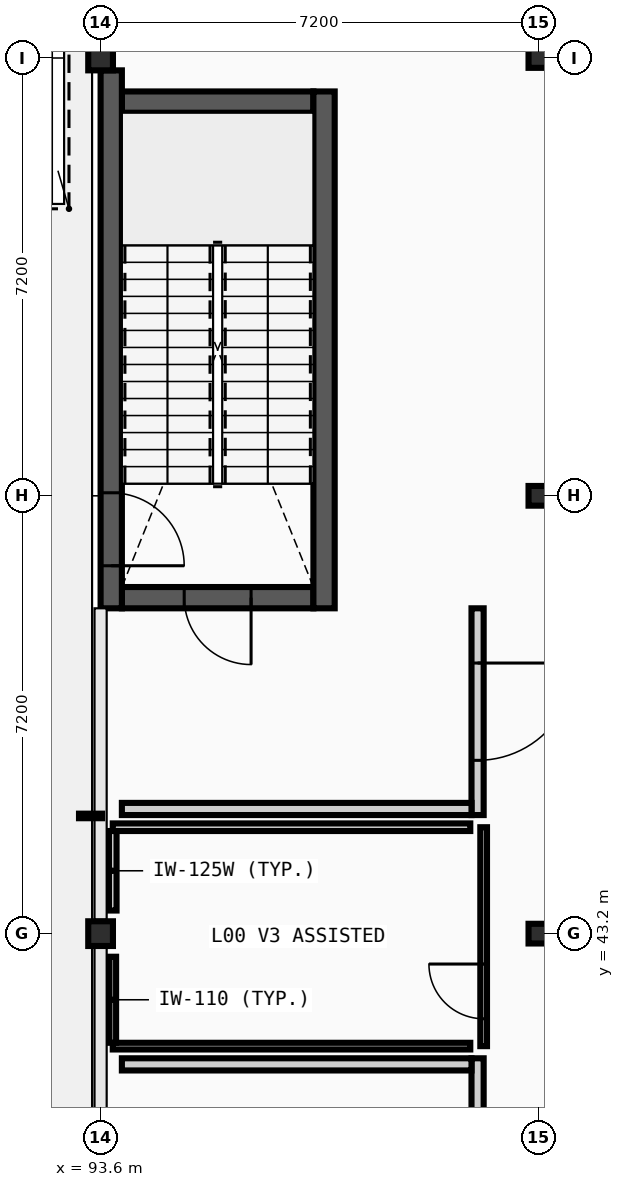
"""IFC4 building model, lengths in metres.
Left out: names, types, materials, properties, quantities, classifications, styles, units other than length and angle.
Written with IfcOpenShell. Run it as: python <this file> out.ifc"""

import sys

from ifc_helpers import new_model, si_unit, direction, frame, frame_2d, origin, origin_2d, place, context, subcontext, project, spatial, rectangle, hollow_circle, extrude, element, fill, save


model = new_model("IFC4")
c1 = context("Model", 3, precision=1e-05, world=origin(), true_north=direction((0.0, 1.0)))
c2 = subcontext(c1, "Body", "Model", "MODEL_VIEW")
j1 = project(units=[si_unit("LENGTHUNIT", "METRE"), si_unit("PLANEANGLEUNIT", "RADIAN")], contexts=[c1])
p1 = place(None, origin())
s1 = spatial("IfcSite", under=j1, at=p1, CompositionType="ELEMENT")
p2 = place(p1, origin())
s2 = spatial("IfcBuilding", under=s1, at=p2, CompositionType="ELEMENT")
p3 = place(p2, origin())
s3 = spatial("IfcBuildingStorey", under=s2, at=p3, CompositionType="ELEMENT", Elevation=0.0)
for number, where, z_axis, x_axis in (
    (1, (93.6, 43.2, 0.0), (0.0, 0.0, 1.0), (1.0, 0.0, 0.0)),
    (2, (93.6, 57.6, 0.0), (0.0, 0.0, 1.0), (1.0, 0.0, 0.0)),
):
    element("IfcColumn", number, at=place(p3, frame(where, z_axis=z_axis, x_axis=x_axis)), inside=s3, PredefinedType="COLUMN", context=c2, shape_type="SweptSolid", body=[
        extrude(hollow_circle(Radius=0.203, WallThickness=0.016, at=origin_2d()), origin(), (0.0, 0.0, 1.0), 5.2),
    ])
for number, where, z_axis, x_axis in (
    (3, (100.8, 43.2, 0.0), (0.0, 0.0, 1.0), (1.0, 0.0, 0.0)),
    (4, (100.8, 50.4, 0.0), (0.0, 0.0, 1.0), (1.0, 0.0, 0.0)),
    (5, (100.8, 57.6, 0.0), (0.0, 0.0, 1.0), (1.0, 0.0, 0.0)),
):
    element("IfcColumn", number, at=place(p3, frame(where, z_axis=z_axis, x_axis=x_axis)), inside=s3, PredefinedType="COLUMN", context=c2, shape_type="SweptSolid", body=[
        extrude(hollow_circle(Radius=0.162, WallThickness=0.012, at=origin_2d()), origin(), (0.0, 0.0, 1.0), 5.2),
    ])
p4 = place(p3, frame((99.8, 37.75, 0.0), z_axis=(0.0, 0.0, 1.0), x_axis=(0.0, 1.0, 0.0)))
e6 = element("IfcWall", 6, at=p4, inside=s3, PredefinedType="PARTITIONING", context=c2, shape_type="SweptSolid", body=[
    extrude(rectangle(XDim=3.4, YDim=0.2, at=frame_2d((1.7, 0.0))), origin(), (0.0, 0.0, 1.0), 4.97),
])
p5 = place(p4, frame((0.9, 0.0, 0.0)))
e7 = element("IfcOpeningElement", 7, at=p5, cuts=e6, PredefinedType="OPENING", context=c2, shape_type="SweptSolid", body=[
    extrude(rectangle(XDim=1.6, YDim=2.2, at=frame_2d((0.8, 1.1))), frame((0.0, 0.11, 0.0), z_axis=(0.0, -1.0, 0.0), x_axis=(1.0, 0.0, 0.0)), (0.0, 0.0, 1.0), 0.22),
])
p6 = place(p3, frame((93.95, 41.05, 0.0), z_axis=(0.0, 0.0, 1.0), x_axis=(1.0, 0.0, 0.0)))
e8 = element("IfcWall", 8, at=p6, inside=s3, PredefinedType="PARTITIONING", context=c2, shape_type="SweptSolid", body=[
    extrude(rectangle(XDim=5.75, YDim=0.2, at=frame_2d((2.875, 0.0))), origin(), (0.0, 0.0, 1.0), 4.97),
])
p7 = place(p3, frame((93.95, 48.725, 0.0), z_axis=(0.0, 0.0, 1.0), x_axis=(1.0, 0.0, 0.0)))
e9 = element("IfcWall", 9, at=p7, inside=s3, PredefinedType="SHEAR", context=c2, shape_type="SweptSolid", body=[
    extrude(rectangle(XDim=3.15, YDim=0.35, at=frame_2d((1.575, 0.0))), origin(), (0.0, 0.0, 1.0), 4.97),
])
p8 = place(p7, frame((1.025, 0.0, 0.0)))
e10 = element("IfcOpeningElement", 10, at=p8, cuts=e9, PredefinedType="OPENING", context=c2, shape_type="SweptSolid", body=[
    extrude(rectangle(XDim=1.1, YDim=2.15, at=frame_2d((0.55, 1.075))), frame((0.0, 0.185, 0.0), z_axis=(0.0, -1.0, 0.0), x_axis=(1.0, 0.0, 0.0)), (0.0, 0.0, 1.0), 0.37),
])
p9 = place(p3, frame((93.95, 56.875, 0.0), z_axis=(0.0, 0.0, 1.0), x_axis=(1.0, 0.0, 0.0)))
e11 = element("IfcWall", 11, at=p9, inside=s3, PredefinedType="SHEAR", context=c2, shape_type="SweptSolid", body=[
    extrude(rectangle(XDim=3.15, YDim=0.35, at=frame_2d((1.575, 0.0))), origin(), (0.0, 0.0, 1.0), 4.97),
])
p10 = place(p3, frame((93.775, 48.55, 0.0), z_axis=(0.0, 0.0, 1.0), x_axis=(0.0, 1.0, 0.0)))
e12 = element("IfcWall", 12, at=p10, inside=s3, PredefinedType="SHEAR", context=c2, shape_type="SweptSolid", body=[
    extrude(rectangle(XDim=8.847, YDim=0.35, at=frame_2d((4.423, 0.0))), origin(), (0.0, 0.0, 1.0), 4.97),
])
p11 = place(p10, frame((0.7, 0.0, 0.0)))
e13 = element("IfcOpeningElement", 13, at=p11, cuts=e12, PredefinedType="OPENING", context=c2, shape_type="SweptSolid", body=[
    extrude(rectangle(XDim=1.2, YDim=2.15, at=frame_2d((0.6, 1.075))), frame((0.0, 0.185, 0.0), z_axis=(0.0, -1.0, 0.0), x_axis=(1.0, 0.0, 0.0)), (0.0, 0.0, 1.0), 0.37),
])
p12 = place(p3, frame((97.275, 48.55, 0.0), z_axis=(0.0, 0.0, 1.0), x_axis=(0.0, 1.0, 0.0)))
e14 = element("IfcWall", 14, at=p12, inside=s3, PredefinedType="SHEAR", context=c2, shape_type="SweptSolid", body=[
    extrude(rectangle(XDim=8.5, YDim=0.35, at=frame_2d((4.25, 0.0))), origin(), (0.0, 0.0, 1.0), 4.97),
])
p13 = place(p3, frame((99.8, 45.15, 0.0), z_axis=(0.0, 0.0, 1.0), x_axis=(0.0, 1.0, 0.0)))
e15 = element("IfcWall", 15, at=p13, inside=s3, PredefinedType="PARTITIONING", context=c2, shape_type="SweptSolid", body=[
    extrude(rectangle(XDim=3.4, YDim=0.2, at=frame_2d((1.7, 0.0))), origin(), (0.0, 0.0, 1.0), 4.97),
])
p14 = place(p13, frame((0.9, 0.0, 0.0)))
e16 = element("IfcOpeningElement", 16, at=p14, cuts=e15, PredefinedType="OPENING", context=c2, shape_type="SweptSolid", body=[
    extrude(rectangle(XDim=1.6, YDim=2.2, at=frame_2d((0.8, 1.1))), frame((0.0, 0.11, 0.0), z_axis=(0.0, -1.0, 0.0), x_axis=(1.0, 0.0, 0.0)), (0.0, 0.0, 1.0), 0.22),
])
p15 = place(p3, frame((93.95, 45.25, 0.0), z_axis=(0.0, 0.0, 1.0), x_axis=(1.0, 0.0, 0.0)))
e17 = element("IfcWall", 17, at=p15, inside=s3, PredefinedType="PARTITIONING", context=c2, shape_type="SweptSolid", body=[
    extrude(rectangle(XDim=5.75, YDim=0.2, at=frame_2d((2.875, 0.0))), origin(), (0.0, 0.0, 1.0), 4.97),
])
p16 = place(p3, frame((93.8, 41.35, 0.0), z_axis=(0.0, 0.0, 1.0), x_axis=(1.0, 0.0, 0.0)))
e18 = element("IfcWall", 18, at=p16, inside=s3, PredefinedType="PARTITIONING", context=c2, shape_type="SweptSolid", body=[
    extrude(rectangle(XDim=5.88, YDim=0.11, at=frame_2d((2.94, 0.0))), origin(), (0.0, 0.0, 1.0), 4.97),
])
p17 = place(p3, frame((93.8, 44.95, 0.0), z_axis=(0.0, 0.0, 1.0), x_axis=(1.0, 0.0, 0.0)))
e19 = element("IfcWall", 19, at=p17, inside=s3, PredefinedType="PARTITIONING", context=c2, shape_type="SweptSolid", body=[
    extrude(rectangle(XDim=5.88, YDim=0.125, at=frame_2d((2.94, 0.0))), origin(), (0.0, 0.0, 1.0), 4.97),
])
p18 = place(p3, frame((93.8, 41.405, 0.0), z_axis=(0.0, 0.0, 1.0), x_axis=(0.0, 1.0, 0.0)))
e20 = element("IfcWall", 20, at=p18, inside=s3, PredefinedType="PARTITIONING", context=c2, shape_type="SweptSolid", body=[
    extrude(rectangle(XDim=1.415, YDim=0.11, at=frame_2d((0.708, 0.0))), origin(), (0.0, 0.0, 1.0), 4.97),
])
p19 = place(p3, frame((93.8, 43.58, 0.0), z_axis=(0.0, 0.0, 1.0), x_axis=(0.0, 1.0, 0.0)))
e21 = element("IfcWall", 21, at=p19, inside=s3, PredefinedType="PARTITIONING", context=c2, shape_type="SweptSolid", body=[
    extrude(rectangle(XDim=1.307, YDim=0.125, at=frame_2d((0.654, 0.0))), origin(), (0.0, 0.0, 1.0), 4.97),
])
p20 = place(p3, frame((99.9, 41.35, 0.0), z_axis=(0.0, 0.0, 1.0), x_axis=(0.0, 1.0, 0.0)))
e22 = element("IfcWall", 22, at=p20, inside=s3, PredefinedType="PARTITIONING", context=c2, shape_type="SweptSolid", body=[
    extrude(rectangle(XDim=3.6, YDim=0.11, at=frame_2d((1.8, 0.0))), origin(), (0.0, 0.0, 1.0), 4.97),
])
p21 = place(p20, frame((0.45, 0.0, 0.0)))
e23 = element("IfcOpeningElement", 23, at=p21, cuts=e22, PredefinedType="OPENING", context=c2, shape_type="SweptSolid", body=[
    extrude(rectangle(XDim=0.9, YDim=2.1, at=frame_2d((0.45, 1.05))), frame((0.0, 0.065, 0.0), z_axis=(0.0, -1.0, 0.0), x_axis=(1.0, 0.0, 0.0)), (0.0, 0.0, 1.0), 0.13),
])
p22 = place(p8, origin())
e24 = element("IfcDoor", 24, at=p22, inside=s3, OperationType="SINGLE_SWING_RIGHT", PredefinedType="DOOR", context=c2, shape_type="SweptSolid", body=[
    extrude(rectangle(XDim=1.1, YDim=2.15, at=frame_2d((0.55, 1.075))), frame((0.0, 0.025, 0.0), z_axis=(0.0, -1.0, 0.0), x_axis=(1.0, 0.0, 0.0)), (0.0, 0.0, 1.0), 0.05),
])
fill(e10, e24)
p23 = place(p11, frame((1.2, 0.0, 0.0), z_axis=(0.0, 0.0, 1.0), x_axis=(-1.0, 0.0, 0.0)))
e25 = element("IfcDoor", 25, at=p23, inside=s3, OperationType="SINGLE_SWING_LEFT", PredefinedType="DOOR", context=c2, shape_type="SweptSolid", body=[
    extrude(rectangle(XDim=1.2, YDim=2.15, at=frame_2d((0.6, 1.075))), frame((0.0, 0.025, 0.0), z_axis=(0.0, -1.0, 0.0), x_axis=(1.0, 0.0, 0.0)), (0.0, 0.0, 1.0), 0.05),
])
fill(e13, e25)
p24 = place(p14, origin())
e26 = element("IfcDoor", 26, at=p24, inside=s3, OperationType="DOUBLE_DOOR_SINGLE_SWING", PredefinedType="DOOR", context=c2, shape_type="SweptSolid", body=[
    extrude(rectangle(XDim=1.6, YDim=2.2, at=frame_2d((0.8, 1.1))), frame((0.0, 0.025, 0.0), z_axis=(0.0, -1.0, 0.0), x_axis=(1.0, 0.0, 0.0)), (0.0, 0.0, 1.0), 0.05),
])
fill(e16, e26)
p25 = place(p21, frame((0.9, 0.0, 0.0), z_axis=(0.0, 0.0, 1.0), x_axis=(-1.0, 0.0, 0.0)))
e27 = element("IfcDoor", 27, at=p25, inside=s3, OperationType="SINGLE_SWING_RIGHT", PredefinedType="DOOR", context=c2, shape_type="SweptSolid", body=[
    extrude(rectangle(XDim=0.9, YDim=2.1, at=frame_2d((0.45, 1.05))), frame((0.0, 0.025, 0.0), z_axis=(0.0, -1.0, 0.0), x_axis=(1.0, 0.0, 0.0)), (0.0, 0.0, 1.0), 0.05),
])
fill(e23, e27)
save(model, sys.argv[1])
